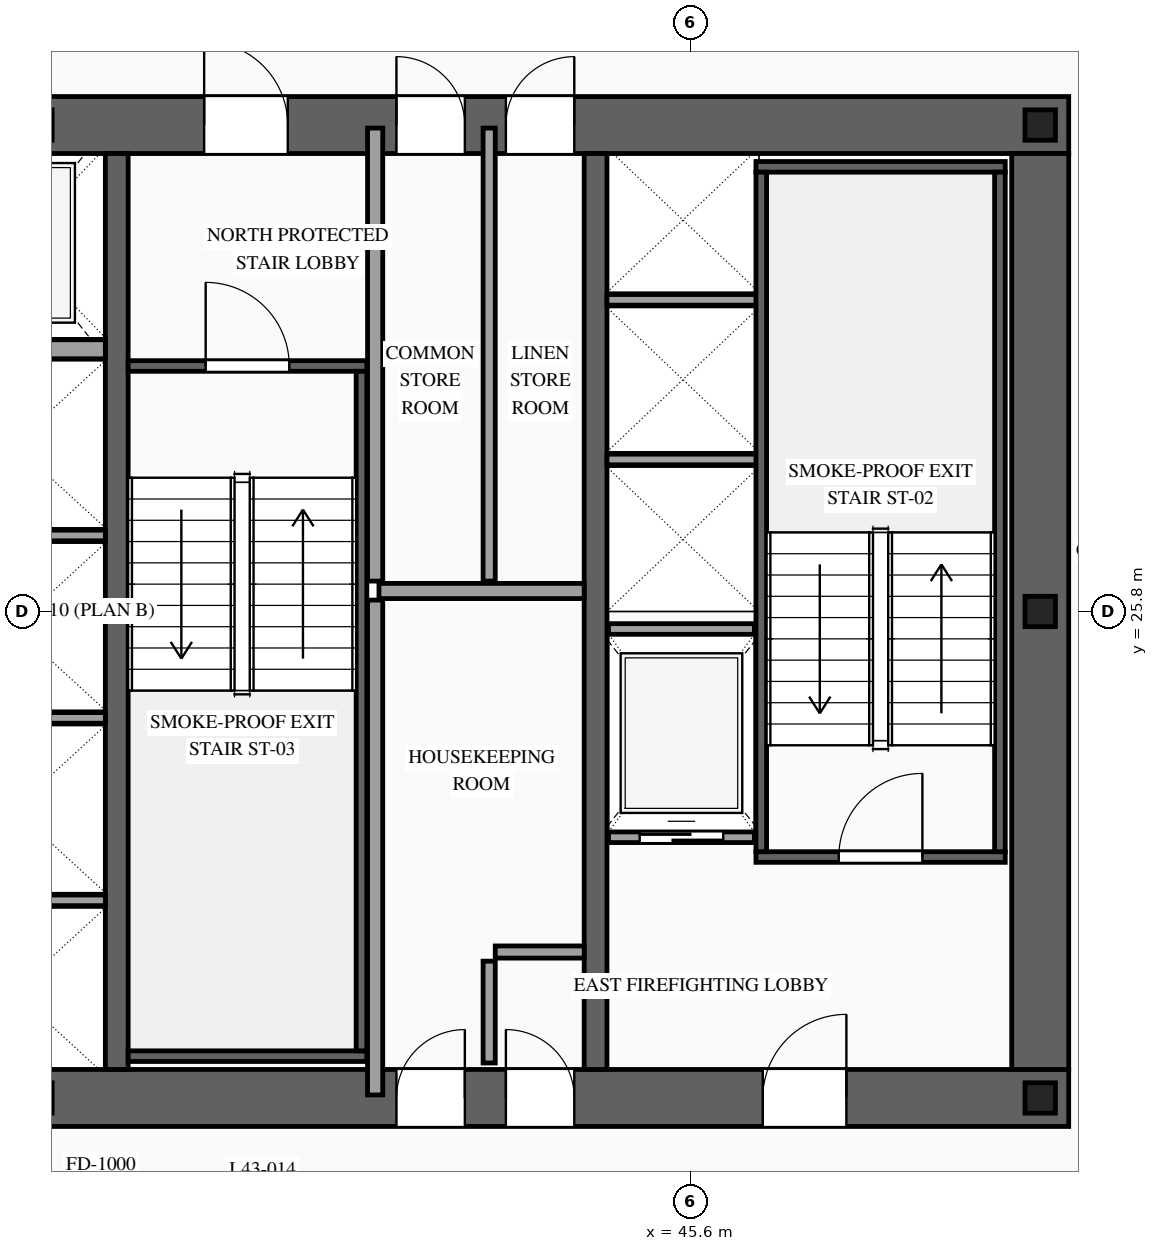
"""IFC4 building model, lengths in metres.
Left out: names, types, materials, properties, quantities, classifications, styles, units other than length and angle.
Written with IfcOpenShell. Run it as: python <this file> out.ifc"""

import sys

from ifc_helpers import new_model, si_unit, direction, frame, frame_2d, origin, origin_2d, place, context, subcontext, project, spatial, rectangle, i_section, extrude, source, transform, mapped, element, fill, save


model = new_model("IFC4")
c1 = context("Model", 3, precision=1e-05, world=origin(), true_north=direction((0.0, 1.0)))
c2 = subcontext(c1, "Body", "Model", "MODEL_VIEW")
j1 = project(units=[si_unit("LENGTHUNIT", "METRE"), si_unit("PLANEANGLEUNIT", "RADIAN")], contexts=[c1])
p1 = place(None, origin())
s1 = spatial("IfcSite", under=j1, at=p1, CompositionType="ELEMENT")
p2 = place(p1, origin())
s2 = spatial("IfcBuilding", under=s1, at=p2, CompositionType="ELEMENT")
p3 = place(p2, frame((0.0, 0.0, 163.2)))
s3 = spatial("IfcBuildingStorey", under=s2, at=p3, CompositionType="ELEMENT", Elevation=163.2)
p4 = place(p3, frame((23.425, 19.4, 0.0), z_axis=(0.0, 0.0, 1.0), x_axis=(1.0, 0.0, 0.0)))
e1 = element("IfcWall", 1, at=p4, inside=s3, PredefinedType="SHEAR", context=c2, shape_type="SweptSolid", body=[
    extrude(rectangle(XDim=27.15, YDim=0.75, at=frame_2d((13.575, 0.0))), origin(), (0.0, 0.0, 1.0), 3.6),
])
p5 = place(p4, frame((2.025, 0.0, 0.0)))
e2 = element("IfcOpeningElement", 2, at=p5, cuts=e1, PredefinedType="OPENING", context=c2, shape_type="SweptSolid", body=[
    extrude(rectangle(XDim=1.1, YDim=2.2, at=frame_2d((0.55, 1.1))), frame((0.0, 0.39, 0.0), z_axis=(0.0, -1.0, 0.0), x_axis=(1.0, 0.0, 0.0)), (0.0, 0.0, 1.0), 0.78),
])
p6 = place(p4, frame((9.925, 0.0, 0.0)))
e3 = element("IfcOpeningElement", 3, at=p6, cuts=e1, PredefinedType="OPENING", context=c2, shape_type="SweptSolid", body=[
    extrude(rectangle(XDim=1.1, YDim=2.2, at=frame_2d((0.55, 1.1))), frame((0.0, 0.39, 0.0), z_axis=(0.0, -1.0, 0.0), x_axis=(1.0, 0.0, 0.0)), (0.0, 0.0, 1.0), 0.78),
])
p7 = place(p4, frame((23.125, 0.0, 0.0)))
e4 = element("IfcOpeningElement", 4, at=p7, cuts=e1, PredefinedType="OPENING", context=c2, shape_type="SweptSolid", body=[
    extrude(rectangle(XDim=1.1, YDim=2.2, at=frame_2d((0.55, 1.1))), frame((0.0, 0.39, 0.0), z_axis=(0.0, -1.0, 0.0), x_axis=(1.0, 0.0, 0.0)), (0.0, 0.0, 1.0), 0.78),
])
p8 = place(p4, frame((19.745, 0.0, 0.0)))
e5 = element("IfcOpeningElement", 5, at=p8, cuts=e1, PredefinedType="OPENING", context=c2, shape_type="SweptSolid", body=[
    extrude(rectangle(XDim=0.9, YDim=2.15, at=frame_2d((0.45, 1.075))), frame((0.0, 0.39, 0.0), z_axis=(0.0, -1.0, 0.0), x_axis=(1.0, 0.0, 0.0)), (0.0, 0.0, 1.0), 0.78),
])
p9 = place(p4, frame((18.305, 0.0, 0.0)))
e6 = element("IfcOpeningElement", 6, at=p9, cuts=e1, PredefinedType="OPENING", context=c2, shape_type="SweptSolid", body=[
    extrude(rectangle(XDim=0.9, YDim=2.15, at=frame_2d((0.45, 1.075))), frame((0.0, 0.39, 0.0), z_axis=(0.0, -1.0, 0.0), x_axis=(1.0, 0.0, 0.0)), (0.0, 0.0, 1.0), 0.78),
])
p10 = place(p3, frame((23.425, 32.2, 0.0), z_axis=(0.0, 0.0, 1.0), x_axis=(1.0, 0.0, 0.0)))
e7 = element("IfcWall", 7, at=p10, inside=s3, PredefinedType="SHEAR", context=c2, shape_type="SweptSolid", body=[
    extrude(rectangle(XDim=27.15, YDim=0.75, at=frame_2d((13.575, 0.0))), origin(), (0.0, 0.0, 1.0), 3.6),
])
p11 = place(p10, frame((4.645, 0.0, 0.0)))
e8 = element("IfcOpeningElement", 8, at=p11, cuts=e7, PredefinedType="OPENING", context=c2, shape_type="SweptSolid", body=[
    extrude(rectangle(XDim=0.9, YDim=2.15, at=frame_2d((0.45, 1.075))), frame((0.0, 0.39, 0.0), z_axis=(0.0, -1.0, 0.0), x_axis=(1.0, 0.0, 0.0)), (0.0, 0.0, 1.0), 0.78),
])
p12 = place(p10, frame((9.925, 0.0, 0.0)))
e9 = element("IfcOpeningElement", 9, at=p12, cuts=e7, PredefinedType="OPENING", context=c2, shape_type="SweptSolid", body=[
    extrude(rectangle(XDim=1.1, YDim=2.2, at=frame_2d((0.55, 1.1))), frame((0.0, 0.39, 0.0), z_axis=(0.0, -1.0, 0.0), x_axis=(1.0, 0.0, 0.0)), (0.0, 0.0, 1.0), 0.78),
])
p13 = place(p10, frame((15.775, 0.0, 0.0)))
e10 = element("IfcOpeningElement", 10, at=p13, cuts=e7, PredefinedType="OPENING", context=c2, shape_type="SweptSolid", body=[
    extrude(rectangle(XDim=1.1, YDim=2.2, at=frame_2d((0.55, 1.1))), frame((0.0, 0.39, 0.0), z_axis=(0.0, -1.0, 0.0), x_axis=(1.0, 0.0, 0.0)), (0.0, 0.0, 1.0), 0.78),
])
p14 = place(p10, frame((18.305, 0.0, 0.0)))
e11 = element("IfcOpeningElement", 11, at=p14, cuts=e7, PredefinedType="OPENING", context=c2, shape_type="SweptSolid", body=[
    extrude(rectangle(XDim=0.9, YDim=2.15, at=frame_2d((0.45, 1.075))), frame((0.0, 0.39, 0.0), z_axis=(0.0, -1.0, 0.0), x_axis=(1.0, 0.0, 0.0)), (0.0, 0.0, 1.0), 0.78),
])
p15 = place(p10, frame((19.745, 0.0, 0.0)))
e12 = element("IfcOpeningElement", 12, at=p15, cuts=e7, PredefinedType="OPENING", context=c2, shape_type="SweptSolid", body=[
    extrude(rectangle(XDim=0.9, YDim=2.15, at=frame_2d((0.45, 1.075))), frame((0.0, 0.39, 0.0), z_axis=(0.0, -1.0, 0.0), x_axis=(1.0, 0.0, 0.0)), (0.0, 0.0, 1.0), 0.78),
])
m1 = source(origin(), c2, "Body", "SweptSolid", [
    extrude(rectangle(XDim=12.05, YDim=0.75, at=frame_2d((6.025, 0.0))), origin(), (0.0, 0.0, 1.0), 3.6),
])
p16 = place(p3, frame((50.2, 19.775, 0.0), z_axis=(0.0, 0.0, 1.0), x_axis=(0.0, 1.0, 0.0)))
e13 = element("IfcWall", 13, at=p16, inside=s3, PredefinedType="SHEAR", context=c2, shape_type="MappedRepresentation", body=[
    mapped(m1, transform((0.0, 0.0, 0.0), scale=1.0)),
])
m2 = source(origin(), c2, "Body", "SweptSolid", [
    extrude(rectangle(XDim=12.05, YDim=0.3, at=frame_2d((6.025, 0.0))), origin(), (0.0, 0.0, 1.0), 3.6),
])
for number, where, z_axis, x_axis in (
    (14, (38.05, 19.775, 0.0), (0.0, 0.0, 1.0), (0.0, 1.0, 0.0)),
    (15, (44.35, 19.775, 0.0), (0.0, 0.0, 1.0), (0.0, 1.0, 0.0)),
):
    element("IfcWall", number, at=place(p3, frame(where, z_axis=z_axis, x_axis=x_axis)), inside=s3, PredefinedType="SOLIDWALL", context=c2, shape_type="MappedRepresentation", body=[
        mapped(m2, transform((0.0, 0.0, 0.0), scale=1.0)),
    ])
m3 = source(origin(), c2, "Body", "SweptSolid", [
    extrude(i_section(OverallWidth=0.4, OverallDepth=0.4, WebThickness=0.013, FlangeThickness=0.021, at=origin_2d()), origin(), (0.0, 0.0, 1.0), 3.6),
])
for number, where, z_axis, x_axis in (
    (16, (50.2, 19.4, 0.0), (0.0, 0.0, 1.0), (1.0, 0.0, 0.0)),
    (17, (50.2, 25.8, 0.0), (0.0, 0.0, 1.0), (1.0, 0.0, 0.0)),
    (18, (50.2, 32.2, 0.0), (0.0, 0.0, 1.0), (1.0, 0.0, 0.0)),
):
    element("IfcColumn", number, at=place(p3, frame(where, z_axis=z_axis, x_axis=x_axis)), inside=s3, PredefinedType="COLUMN", context=c2, shape_type="MappedRepresentation", body=[
        mapped(m3, transform((0.0, 0.0, 0.0), scale=1.0)),
    ])
p17 = place(p3, frame((44.52, 22.83, 0.0), z_axis=(0.0, 0.0, 1.0), x_axis=(1.0, 0.0, 0.0)))
e19 = element("IfcWall", 19, at=p17, inside=s3, PredefinedType="SOLIDWALL", context=c2, shape_type="SweptSolid", body=[
    extrude(rectangle(XDim=1.92, YDim=0.14, at=frame_2d((0.96, 0.0))), origin(), (0.0, 0.0, 1.0), 3.3),
])
p18 = place(p17, frame((0.41, 0.0, 0.0)))
e20 = element("IfcOpeningElement", 20, at=p18, cuts=e19, PredefinedType="OPENING", context=c2, shape_type="SweptSolid", body=[
    extrude(rectangle(XDim=1.1, YDim=2.2, at=frame_2d((0.55, 1.1))), frame((0.0, 0.085, 0.0), z_axis=(0.0, -1.0, 0.0), x_axis=(1.0, 0.0, 0.0)), (0.0, 0.0, 1.0), 0.17),
])
m4 = source(origin(), c2, "Body", "SweptSolid", [
    extrude(rectangle(XDim=1.92, YDim=0.14, at=frame_2d((0.96, 0.0))), origin(), (0.0, 0.0, 1.0), 3.3),
])
p19 = place(p3, frame((44.52, 25.57, 0.0), z_axis=(0.0, 0.0, 1.0), x_axis=(1.0, 0.0, 0.0)))
e21 = element("IfcWall", 21, at=p19, inside=s3, PredefinedType="SOLIDWALL", context=c2, shape_type="MappedRepresentation", body=[
    mapped(m4, transform((0.0, 0.0, 0.0), scale=1.0)),
])
m5 = source(origin(), c2, "Body", "SweptSolid", [
    extrude(rectangle(XDim=2.4, YDim=0.14, at=frame_2d((1.2, 0.0))), origin(), (0.0, 0.0, 1.0), 3.3),
])
for number, where, z_axis, x_axis in (
    (22, (35.5, 22.0, 0.0), (0.0, 0.0, 1.0), (1.0, 0.0, 0.0)),
    (23, (35.5, 24.4, 0.0), (0.0, 0.0, 1.0), (1.0, 0.0, 0.0)),
    (24, (35.5, 26.8, 0.0), (0.0, 0.0, 1.0), (1.0, 0.0, 0.0)),
):
    element("IfcWall", number, at=place(p3, frame(where, z_axis=z_axis, x_axis=x_axis)), inside=s3, PredefinedType="SOLIDWALL", context=c2, shape_type="MappedRepresentation", body=[
        mapped(m5, transform((0.0, 0.0, 0.0), scale=1.0)),
    ])
m6 = source(origin(), c2, "Body", "SweptSolid", [
    extrude(rectangle(XDim=2.4, YDim=0.25, at=frame_2d((1.2, 0.0))), origin(), (0.0, 0.0, 1.0), 3.3),
])
p20 = place(p3, frame((35.5, 29.25, 0.0), z_axis=(0.0, 0.0, 1.0), x_axis=(1.0, 0.0, 0.0)))
e25 = element("IfcWall", 25, at=p20, inside=s3, PredefinedType="SOLIDWALL", context=c2, shape_type="MappedRepresentation", body=[
    mapped(m6, transform((0.0, 0.0, 0.0), scale=1.0)),
])
m7 = source(origin(), c2, "Body", "SweptSolid", [
    extrude(rectangle(XDim=2.0, YDim=0.14, at=frame_2d((1.0, 0.0))), origin(), (0.0, 0.0, 1.0), 3.3),
])
for number, where, z_axis, x_axis in (
    (26, (44.5, 27.8, 0.0), (0.0, 0.0, 1.0), (1.0, 0.0, 0.0)),
    (27, (44.5, 29.9, 0.0), (0.0, 0.0, 1.0), (1.0, 0.0, 0.0)),
):
    element("IfcWall", number, at=place(p3, frame(where, z_axis=z_axis, x_axis=x_axis)), inside=s3, PredefinedType="SOLIDWALL", context=c2, shape_type="MappedRepresentation", body=[
        mapped(m7, transform((0.0, 0.0, 0.0), scale=1.0)),
    ])
p21 = place(p3, frame((46.46, 22.57, 0.0), z_axis=(0.0, 0.0, 1.0), x_axis=(1.0, 0.0, 0.0)))
e28 = element("IfcWall", 28, at=p21, inside=s3, PredefinedType="SOLIDWALL", context=c2, shape_type="SweptSolid", body=[
    extrude(rectangle(XDim=3.28, YDim=0.14, at=frame_2d((1.64, 0.0))), origin(), (0.0, 0.0, 1.0), 3.3),
])
p22 = place(p21, frame((1.09, 0.0, 0.0)))
e29 = element("IfcOpeningElement", 29, at=p22, cuts=e28, PredefinedType="OPENING", context=c2, shape_type="SweptSolid", body=[
    extrude(rectangle(XDim=1.1, YDim=2.2, at=frame_2d((0.55, 1.1))), frame((0.0, 0.085, 0.0), z_axis=(0.0, -1.0, 0.0), x_axis=(1.0, 0.0, 0.0)), (0.0, 0.0, 1.0), 0.17),
])
m8 = source(origin(), c2, "Body", "SweptSolid", [
    extrude(rectangle(XDim=3.28, YDim=0.14, at=frame_2d((1.64, 0.0))), origin(), (0.0, 0.0, 1.0), 3.3),
])
p23 = place(p3, frame((46.46, 31.65, 0.0), z_axis=(0.0, 0.0, 1.0), x_axis=(1.0, 0.0, 0.0)))
e30 = element("IfcWall", 30, at=p23, inside=s3, PredefinedType="SOLIDWALL", context=c2, shape_type="MappedRepresentation", body=[
    mapped(m8, transform((0.0, 0.0, 0.0), scale=1.0)),
])
m9 = source(origin(), c2, "Body", "SweptSolid", [
    extrude(rectangle(XDim=8.94, YDim=0.14, at=frame_2d((4.47, 0.0))), origin(), (0.0, 0.0, 1.0), 3.3),
])
for number, where, z_axis, x_axis in (
    (31, (46.53, 22.64, 0.0), (0.0, 0.0, 1.0), (0.0, 1.0, 0.0)),
    (32, (49.67, 22.64, 0.0), (0.0, 0.0, 1.0), (0.0, 1.0, 0.0)),
):
    element("IfcWall", number, at=place(p3, frame(where, z_axis=z_axis, x_axis=x_axis)), inside=s3, PredefinedType="SOLIDWALL", context=c2, shape_type="MappedRepresentation", body=[
        mapped(m9, transform((0.0, 0.0, 0.0), scale=1.0)),
    ])
p24 = place(p3, frame((38.2, 29.03, 0.0), z_axis=(0.0, 0.0, 1.0), x_axis=(1.0, 0.0, 0.0)))
e33 = element("IfcWall", 33, at=p24, inside=s3, PredefinedType="SOLIDWALL", context=c2, shape_type="SweptSolid", body=[
    extrude(rectangle(XDim=3.14, YDim=0.14, at=frame_2d((1.57, 0.0))), origin(), (0.0, 0.0, 1.0), 3.3),
])
p25 = place(p24, frame((1.02, 0.0, 0.0)))
e34 = element("IfcOpeningElement", 34, at=p25, cuts=e33, PredefinedType="OPENING", context=c2, shape_type="SweptSolid", body=[
    extrude(rectangle(XDim=1.1, YDim=2.2, at=frame_2d((0.55, 1.1))), frame((0.0, 0.085, 0.0), z_axis=(0.0, -1.0, 0.0), x_axis=(1.0, 0.0, 0.0)), (0.0, 0.0, 1.0), 0.17),
])
m10 = source(origin(), c2, "Body", "SweptSolid", [
    extrude(rectangle(XDim=3.14, YDim=0.14, at=frame_2d((1.57, 0.0))), origin(), (0.0, 0.0, 1.0), 3.3),
])
p26 = place(p3, frame((38.2, 19.95, 0.0), z_axis=(0.0, 0.0, 1.0), x_axis=(1.0, 0.0, 0.0)))
e35 = element("IfcWall", 35, at=p26, inside=s3, PredefinedType="SOLIDWALL", context=c2, shape_type="MappedRepresentation", body=[
    mapped(m10, transform((0.0, 0.0, 0.0), scale=1.0)),
])
m11 = source(origin(), c2, "Body", "SweptSolid", [
    extrude(rectangle(XDim=8.94, YDim=0.14, at=frame_2d((4.47, 0.0))), origin(), (0.0, 0.0, 1.0), 3.3),
])
p27 = place(p3, frame((41.27, 20.02, 0.0), z_axis=(0.0, 0.0, 1.0), x_axis=(0.0, 1.0, 0.0)))
e36 = element("IfcWall", 36, at=p27, inside=s3, PredefinedType="SOLIDWALL", context=c2, shape_type="MappedRepresentation", body=[
    mapped(m11, transform((0.0, 0.0, 0.0), scale=1.0)),
])
m12 = source(origin(), c2, "Body", "SweptSolid", [
    extrude(rectangle(XDim=1.34, YDim=0.16, at=frame_2d((0.67, 0.0))), origin(), (0.0, 0.0, 1.0), 3.3),
])
p28 = place(p3, frame((42.95, 19.86, 0.0), z_axis=(0.0, 0.0, 1.0), x_axis=(0.0, 1.0, 0.0)))
e37 = element("IfcWall", 37, at=p28, inside=s3, PredefinedType="PARTITIONING", context=c2, shape_type="MappedRepresentation", body=[
    mapped(m12, transform((0.0, 0.0, 0.0), scale=1.0)),
])
m13 = source(origin(), c2, "Body", "SweptSolid", [
    extrude(rectangle(XDim=1.17, YDim=0.16, at=frame_2d((0.585, 0.0))), origin(), (0.0, 0.0, 1.0), 3.3),
])
p29 = place(p3, frame((43.03, 21.32, 0.0), z_axis=(0.0, 0.0, 1.0), x_axis=(1.0, 0.0, 0.0)))
e38 = element("IfcWall", 38, at=p29, inside=s3, PredefinedType="PARTITIONING", context=c2, shape_type="MappedRepresentation", body=[
    mapped(m13, transform((0.0, 0.0, 0.0), scale=1.0)),
])
m14 = source(origin(), c2, "Body", "SweptSolid", [
    extrude(rectangle(XDim=6.51, YDim=0.2, at=frame_2d((3.255, 0.0))), origin(), (0.0, 0.0, 1.0), 3.3),
])
p30 = place(p3, frame((41.45, 19.44, 0.0), z_axis=(0.0, 0.0, 1.0), x_axis=(0.0, 1.0, 0.0)))
e39 = element("IfcWall", 39, at=p30, inside=s3, PredefinedType="PARTITIONING", context=c2, shape_type="MappedRepresentation", body=[
    mapped(m14, transform((0.0, 0.0, 0.0), scale=1.0)),
])
m15 = source(origin(), c2, "Body", "SweptSolid", [
    extrude(rectangle(XDim=2.7, YDim=0.2, at=frame_2d((1.35, 0.0))), origin(), (0.0, 0.0, 1.0), 3.3),
])
p31 = place(p3, frame((41.5, 26.07, 0.0), z_axis=(0.0, 0.0, 1.0), x_axis=(1.0, 0.0, 0.0)))
e40 = element("IfcWall", 40, at=p31, inside=s3, PredefinedType="PARTITIONING", context=c2, shape_type="MappedRepresentation", body=[
    mapped(m15, transform((0.0, 0.0, 0.0), scale=1.0)),
])
m16 = source(origin(), c2, "Body", "SweptSolid", [
    extrude(rectangle(XDim=5.96, YDim=0.2, at=frame_2d((2.98, 0.0))), origin(), (0.0, 0.0, 1.0), 3.3),
])
p32 = place(p3, frame((41.45, 26.2, 0.0), z_axis=(0.0, 0.0, 1.0), x_axis=(0.0, 1.0, 0.0)))
e41 = element("IfcWall", 41, at=p32, inside=s3, PredefinedType="PARTITIONING", context=c2, shape_type="MappedRepresentation", body=[
    mapped(m16, transform((0.0, 0.0, 0.0), scale=1.0)),
])
m17 = source(origin(), c2, "Body", "SweptSolid", [
    extrude(rectangle(XDim=5.96, YDim=0.16, at=frame_2d((2.98, 0.0))), origin(), (0.0, 0.0, 1.0), 3.3),
])
p33 = place(p3, frame((42.95, 26.2, 0.0), z_axis=(0.0, 0.0, 1.0), x_axis=(0.0, 1.0, 0.0)))
e42 = element("IfcWall", 42, at=p33, inside=s3, PredefinedType="PARTITIONING", context=c2, shape_type="MappedRepresentation", body=[
    mapped(m17, transform((0.0, 0.0, 0.0), scale=1.0)),
])
m18 = source(origin(), c2, "Body", "SweptSolid", [
    extrude(rectangle(XDim=1.1, YDim=2.2, at=frame_2d((0.55, 1.1))), frame((0.0, 0.025, 0.0), z_axis=(0.0, -1.0, 0.0), x_axis=(1.0, 0.0, 0.0)), (0.0, 0.0, 1.0), 0.05),
])
p34 = place(p18, origin())
e43 = element("IfcDoor", 43, at=p34, inside=s3, OperationType="SLIDING_TO_RIGHT", PredefinedType="DOOR", context=c2, shape_type="MappedRepresentation", body=[
    mapped(m18, transform((0.0, 0.0, 0.0), scale=1.0)),
])
fill(e20, e43)
m19 = source(origin(), c2, "Body", "SweptSolid", [
    extrude(rectangle(XDim=1.1, YDim=2.2, at=frame_2d((0.55, 1.1))), frame((0.0, 0.025, 0.0), z_axis=(0.0, -1.0, 0.0), x_axis=(1.0, 0.0, 0.0)), (0.0, 0.0, 1.0), 0.05),
])
p35 = place(p22, origin())
e44 = element("IfcDoor", 44, at=p35, inside=s3, OperationType="SINGLE_SWING_RIGHT", PredefinedType="DOOR", context=c2, shape_type="MappedRepresentation", body=[
    mapped(m19, transform((0.0, 0.0, 0.0), scale=1.0)),
])
fill(e29, e44)
p36 = place(p25, origin())
e45 = element("IfcDoor", 45, at=p36, inside=s3, OperationType="SINGLE_SWING_LEFT", PredefinedType="DOOR", context=c2, shape_type="MappedRepresentation", body=[
    mapped(m19, transform((0.0, 0.0, 0.0), scale=1.0)),
])
fill(e34, e45)
p37 = place(p7, origin())
e46 = element("IfcDoor", 46, at=p37, inside=s3, OperationType="SINGLE_SWING_RIGHT", PredefinedType="DOOR", context=c2, shape_type="MappedRepresentation", body=[
    mapped(m19, transform((0.0, 0.0, 0.0), scale=1.0)),
])
fill(e4, e46)
p38 = place(p13, origin())
e47 = element("IfcDoor", 47, at=p38, inside=s3, OperationType="SINGLE_SWING_LEFT", PredefinedType="DOOR", context=c2, shape_type="MappedRepresentation", body=[
    mapped(m19, transform((0.0, 0.0, 0.0), scale=1.0)),
])
fill(e10, e47)
m20 = source(origin(), c2, "Body", "SweptSolid", [
    extrude(rectangle(XDim=0.9, YDim=2.15, at=frame_2d((0.45, 1.075))), frame((0.0, 0.025, 0.0), z_axis=(0.0, -1.0, 0.0), x_axis=(1.0, 0.0, 0.0)), (0.0, 0.0, 1.0), 0.05),
])
p39 = place(p8, origin())
e48 = element("IfcDoor", 48, at=p39, inside=s3, OperationType="SINGLE_SWING_LEFT", PredefinedType="DOOR", context=c2, shape_type="MappedRepresentation", body=[
    mapped(m20, transform((0.0, 0.0, 0.0), scale=1.0)),
])
fill(e5, e48)
p40 = place(p9, origin())
e49 = element("IfcDoor", 49, at=p40, inside=s3, OperationType="SINGLE_SWING_RIGHT", PredefinedType="DOOR", context=c2, shape_type="MappedRepresentation", body=[
    mapped(m20, transform((0.0, 0.0, 0.0), scale=1.0)),
])
fill(e6, e49)
p41 = place(p14, origin())
e50 = element("IfcDoor", 50, at=p41, inside=s3, OperationType="SINGLE_SWING_LEFT", PredefinedType="DOOR", context=c2, shape_type="MappedRepresentation", body=[
    mapped(m20, transform((0.0, 0.0, 0.0), scale=1.0)),
])
fill(e11, e50)
p42 = place(p15, origin())
e51 = element("IfcDoor", 51, at=p42, inside=s3, OperationType="SINGLE_SWING_RIGHT", PredefinedType="DOOR", context=c2, shape_type="MappedRepresentation", body=[
    mapped(m20, transform((0.0, 0.0, 0.0), scale=1.0)),
])
fill(e12, e51)
save(model, sys.argv[1])
